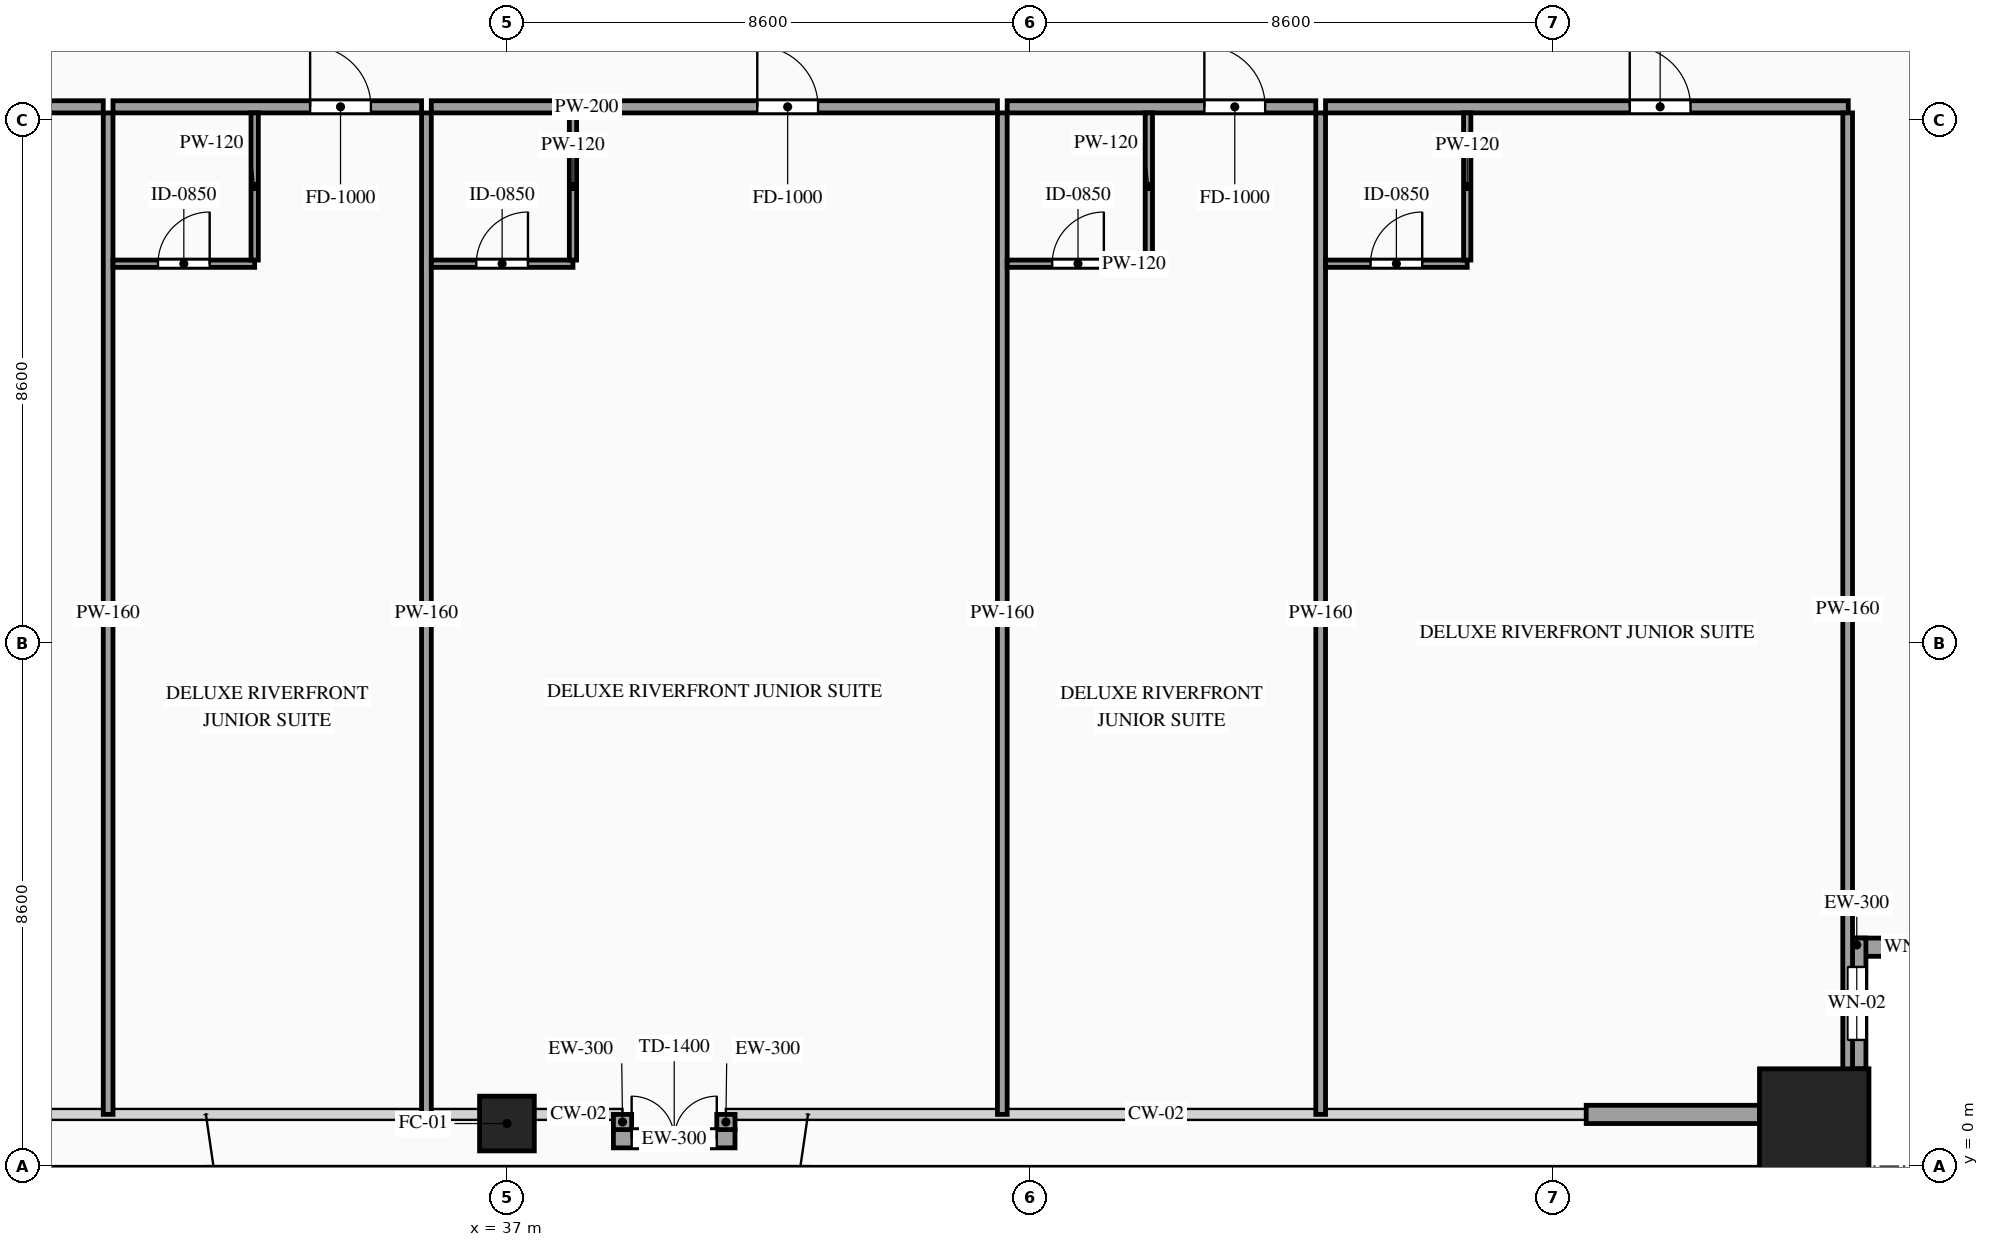
"""IFC4 building model, lengths in metres.
Left out: names, types, materials, properties, quantities, classifications, styles, units other than length and angle.
Written with IfcOpenShell. Run it as: python <this file> out.ifc"""

import sys

from ifc_helpers import new_model, si_unit, direction, frame, frame_2d, origin, origin_2d, place, context, subcontext, project, spatial, rectangle, hollow_rectangle, extrude, source, transform, mapped, element, fill, save


model = new_model("IFC4")
c1 = context("Model", 3, precision=1e-05, world=origin(), true_north=direction((0.0, 1.0)))
c2 = subcontext(c1, "Body", "Model", "MODEL_VIEW")
j1 = project(units=[si_unit("LENGTHUNIT", "METRE"), si_unit("PLANEANGLEUNIT", "RADIAN")], contexts=[c1])
p1 = place(None, origin())
s1 = spatial("IfcSite", under=j1, at=p1, CompositionType="ELEMENT")
p2 = place(p1, origin())
s2 = spatial("IfcBuilding", under=s1, at=p2, CompositionType="ELEMENT")
p3 = place(p2, frame((0.0, 0.0, 64.0)))
s3 = spatial("IfcBuildingStorey", under=s2, at=p3, CompositionType="ELEMENT", Elevation=64.0)
m1 = source(origin(), c2, "Body", "SweptSolid", [
    extrude(hollow_rectangle(XDim=0.9, YDim=0.9, WallThickness=0.042, at=origin_2d()), origin(), (0.0, 0.0, 1.0), 3.6),
])
p4 = place(p3, frame((37.0, 0.7, 0.0), z_axis=(0.0, 0.0, 1.0), x_axis=(1.0, 0.0, 0.0)))
e1 = element("IfcColumn", 1, at=p4, inside=s3, PredefinedType="COLUMN", context=c2, shape_type="MappedRepresentation", body=[
    mapped(m1, transform((0.0, 0.0, 0.0), scale=1.0)),
])
m2 = source(origin(), c2, "Body", "SweptSolid", [
    extrude(hollow_rectangle(XDim=1.8, YDim=1.8, WallThickness=0.08, at=origin_2d()), origin(), (0.0, 0.0, 1.0), 3.6),
])
p5 = place(p3, frame((58.5, 0.7, 0.0), z_axis=(0.0, 0.0, 1.0), x_axis=(1.0, 0.0, 0.0)))
e2 = element("IfcColumn", 2, at=p5, inside=s3, PredefinedType="COLUMN", context=c2, shape_type="MappedRepresentation", body=[
    mapped(m2, transform((0.0, 0.0, 0.0), scale=1.0)),
])
p6 = place(p3, frame((59.05, 3.6, 0.0), z_axis=(0.0, 0.0, 1.0), x_axis=(1.0, 0.0, 0.0)))
e3 = element("IfcWall", 3, at=p6, inside=s3, PredefinedType="SOLIDWALL", context=c2, shape_type="SweptSolid", body=[
    extrude(rectangle(XDim=2.15, YDim=0.3, at=frame_2d((1.075, 0.0))), origin(), (0.0, 0.0, 1.0), 3.38),
])
p7 = place(p6, frame((0.625, 0.0, 0.85)))
e4 = element("IfcOpeningElement", 4, at=p7, cuts=e3, PredefinedType="OPENING", context=c2, shape_type="SweptSolid", body=[
    extrude(rectangle(XDim=0.9, YDim=1.5, at=frame_2d((0.45, 0.75))), frame((0.0, 0.165, 0.0), z_axis=(0.0, -1.0, 0.0), x_axis=(1.0, 0.0, 0.0)), (0.0, 0.0, 1.0), 0.33),
])
p8 = place(p3, frame((59.2, 1.6, 0.0), z_axis=(0.0, 0.0, 1.0), x_axis=(0.0, 1.0, 0.0)))
e5 = element("IfcWall", 5, at=p8, inside=s3, PredefinedType="SOLIDWALL", context=c2, shape_type="SweptSolid", body=[
    extrude(rectangle(XDim=2.15, YDim=0.3, at=frame_2d((1.075, 0.0))), origin(), (0.0, 0.0, 1.0), 3.38),
])
p9 = place(p8, frame((0.475, 0.0, 0.85)))
e6 = element("IfcOpeningElement", 6, at=p9, cuts=e5, PredefinedType="OPENING", context=c2, shape_type="SweptSolid", body=[
    extrude(rectangle(XDim=1.2, YDim=2.1, at=frame_2d((0.6, 1.05))), frame((0.0, 0.165, 0.0), z_axis=(0.0, -1.0, 0.0), x_axis=(1.0, 0.0, 0.0)), (0.0, 0.0, 1.0), 0.33),
])
m3 = source(origin(), c2, "Body", "SweptSolid", [
    extrude(rectangle(XDim=2.85, YDim=0.3, at=frame_2d((1.425, 0.0))), origin(), (0.0, 0.0, 1.0), 2.775),
])
p10 = place(p3, frame((54.75, 0.85, 0.0), z_axis=(0.0, 0.0, 1.0), x_axis=(1.0, 0.0, 0.0)))
e7 = element("IfcWall", 7, at=p10, inside=s3, PredefinedType="SOLIDWALL", context=c2, shape_type="MappedRepresentation", body=[
    mapped(m3, transform((0.0, 0.0, 0.0), scale=1.0)),
])
p11 = place(p3, frame((38.751, 0.45, 0.0), z_axis=(0.0, 0.0, 1.0), x_axis=(1.0, 0.0, 0.0)))
e8 = element("IfcWall", 8, at=p11, inside=s3, PredefinedType="SOLIDWALL", context=c2, shape_type="SweptSolid", body=[
    extrude(rectangle(XDim=2.0, YDim=0.3, at=frame_2d((1.0, 0.0))), origin(), (0.0, 0.0, 1.0), 3.38),
])
p12 = place(p11, frame((0.3, 0.0, 0.0)))
e9 = element("IfcOpeningElement", 9, at=p12, cuts=e8, PredefinedType="OPENING", context=c2, shape_type="SweptSolid", body=[
    extrude(rectangle(XDim=1.4, YDim=2.3, at=frame_2d((0.7, 1.15))), frame((0.0, 0.165, 0.0), z_axis=(0.0, -1.0, 0.0), x_axis=(1.0, 0.0, 0.0)), (0.0, 0.0, 1.0), 0.33),
])
m4 = source(origin(), c2, "Body", "SweptSolid", [
    extrude(rectangle(XDim=0.25, YDim=0.3, at=frame_2d((0.125, 0.0))), origin(), (0.0, 0.0, 1.0), 3.38),
])
for number, where, z_axis, x_axis in (
    (10, (38.901, 0.85, 0.0), (0.0, 0.0, 1.0), (0.0, -1.0, 0.0)),
    (11, (40.601, 0.6, 0.0), (0.0, 0.0, 1.0), (0.0, 1.0, 0.0)),
):
    element("IfcWall", number, at=place(p3, frame(where, z_axis=z_axis, x_axis=x_axis)), inside=s3, PredefinedType="SOLIDWALL", context=c2, shape_type="MappedRepresentation", body=[
        mapped(m4, transform((0.0, 0.0, 0.0), scale=1.0)),
    ])
p13 = place(p3, frame((21.197, 17.42, 0.0), z_axis=(0.0, 0.0, 1.0), x_axis=(1.0, 0.0, 0.0)))
e12 = element("IfcWall", 12, at=p13, inside=s3, PredefinedType="PARTITIONING", context=c2, shape_type="SweptSolid", body=[
    extrude(rectangle(XDim=9.164, YDim=0.2, at=frame_2d((4.582, 0.0))), origin(), (0.0, 0.0, 1.0), 3.38),
])
p14 = place(p13, frame((5.287, 0.0, 0.0)))
e13 = element("IfcOpeningElement", 13, at=p14, cuts=e12, PredefinedType="OPENING", context=c2, shape_type="SweptSolid", body=[
    extrude(rectangle(XDim=1.0, YDim=2.2, at=frame_2d((0.5, 1.1))), frame((0.0, 0.115, 0.0), z_axis=(0.0, -1.0, 0.0), x_axis=(1.0, 0.0, 0.0)), (0.0, 0.0, 1.0), 0.23),
])
m5 = source(origin(), c2, "Body", "SweptSolid", [
    extrude(rectangle(XDim=16.47, YDim=0.16, at=frame_2d((8.235, 0.0))), origin(), (0.0, 0.0, 1.0), 3.38),
])
p15 = place(p3, frame((30.441, 0.85, 0.0), z_axis=(0.0, 0.0, 1.0), x_axis=(0.0, 1.0, 0.0)))
e14 = element("IfcWall", 14, at=p15, inside=s3, PredefinedType="PARTITIONING", context=c2, shape_type="MappedRepresentation", body=[
    mapped(m5, transform((0.0, 0.0, 0.0), scale=1.0)),
])
p16 = place(p3, frame((30.521, 17.42, 0.0), z_axis=(0.0, 0.0, 1.0), x_axis=(1.0, 0.0, 0.0)))
e15 = element("IfcWall", 15, at=p16, inside=s3, PredefinedType="PARTITIONING", context=c2, shape_type="SweptSolid", body=[
    extrude(rectangle(XDim=5.075, YDim=0.2, at=frame_2d((2.538, 0.0))), origin(), (0.0, 0.0, 1.0), 3.38),
])
p17 = place(p16, frame((3.242, 0.0, 0.0)))
e16 = element("IfcOpeningElement", 16, at=p17, cuts=e15, PredefinedType="OPENING", context=c2, shape_type="SweptSolid", body=[
    extrude(rectangle(XDim=1.0, YDim=2.2, at=frame_2d((0.5, 1.1))), frame((0.0, 0.115, 0.0), z_axis=(0.0, -1.0, 0.0), x_axis=(1.0, 0.0, 0.0)), (0.0, 0.0, 1.0), 0.23),
])
p18 = place(p3, frame((35.676, 0.85, 0.0), z_axis=(0.0, 0.0, 1.0), x_axis=(0.0, 1.0, 0.0)))
e17 = element("IfcWall", 17, at=p18, inside=s3, PredefinedType="PARTITIONING", context=c2, shape_type="MappedRepresentation", body=[
    mapped(m5, transform((0.0, 0.0, 0.0), scale=1.0)),
])
p19 = place(p3, frame((30.521, 14.84, 0.0), z_axis=(0.0, 0.0, 1.0), x_axis=(1.0, 0.0, 0.0)))
e18 = element("IfcWall", 18, at=p19, inside=s3, PredefinedType="PARTITIONING", context=c2, shape_type="SweptSolid", body=[
    extrude(rectangle(XDim=2.33, YDim=0.12, at=frame_2d((1.165, 0.0))), origin(), (0.0, 0.0, 1.0), 3.38),
])
p20 = place(p19, frame((0.74, 0.0, 0.0)))
e19 = element("IfcOpeningElement", 19, at=p20, cuts=e18, PredefinedType="OPENING", context=c2, shape_type="SweptSolid", body=[
    extrude(rectangle(XDim=0.85, YDim=2.1, at=frame_2d((0.425, 1.05))), frame((0.0, 0.075, 0.0), z_axis=(0.0, -1.0, 0.0), x_axis=(1.0, 0.0, 0.0)), (0.0, 0.0, 1.0), 0.15),
])
m6 = source(origin(), c2, "Body", "SweptSolid", [
    extrude(rectangle(XDim=2.42, YDim=0.12, at=frame_2d((1.21, 0.0))), origin(), (0.0, 0.0, 1.0), 3.38),
])
p21 = place(p3, frame((32.851, 14.9, 0.0), z_axis=(0.0, 0.0, 1.0), x_axis=(0.0, 1.0, 0.0)))
e20 = element("IfcWall", 20, at=p21, inside=s3, PredefinedType="PARTITIONING", context=c2, shape_type="MappedRepresentation", body=[
    mapped(m6, transform((0.0, 0.0, 0.0), scale=1.0)),
])
p22 = place(p3, frame((35.756, 17.42, 0.0), z_axis=(0.0, 0.0, 1.0), x_axis=(1.0, 0.0, 0.0)))
e21 = element("IfcWall", 21, at=p22, inside=s3, PredefinedType="PARTITIONING", context=c2, shape_type="SweptSolid", body=[
    extrude(rectangle(XDim=9.311, YDim=0.2, at=frame_2d((4.655, 0.0))), origin(), (0.0, 0.0, 1.0), 3.38),
])
p23 = place(p22, frame((5.361, 0.0, 0.0)))
e22 = element("IfcOpeningElement", 22, at=p23, cuts=e21, PredefinedType="OPENING", context=c2, shape_type="SweptSolid", body=[
    extrude(rectangle(XDim=1.0, YDim=2.2, at=frame_2d((0.5, 1.1))), frame((0.0, 0.115, 0.0), z_axis=(0.0, -1.0, 0.0), x_axis=(1.0, 0.0, 0.0)), (0.0, 0.0, 1.0), 0.23),
])
p24 = place(p3, frame((45.147, 0.85, 0.0), z_axis=(0.0, 0.0, 1.0), x_axis=(0.0, 1.0, 0.0)))
e23 = element("IfcWall", 23, at=p24, inside=s3, PredefinedType="PARTITIONING", context=c2, shape_type="MappedRepresentation", body=[
    mapped(m5, transform((0.0, 0.0, 0.0), scale=1.0)),
])
p25 = place(p3, frame((35.756, 14.84, 0.0), z_axis=(0.0, 0.0, 1.0), x_axis=(1.0, 0.0, 0.0)))
e24 = element("IfcWall", 24, at=p25, inside=s3, PredefinedType="PARTITIONING", context=c2, shape_type="SweptSolid", body=[
    extrude(rectangle(XDim=2.33, YDim=0.12, at=frame_2d((1.165, 0.0))), origin(), (0.0, 0.0, 1.0), 3.38),
])
p26 = place(p25, frame((0.74, 0.0, 0.0)))
e25 = element("IfcOpeningElement", 25, at=p26, cuts=e24, PredefinedType="OPENING", context=c2, shape_type="SweptSolid", body=[
    extrude(rectangle(XDim=0.85, YDim=2.1, at=frame_2d((0.425, 1.05))), frame((0.0, 0.075, 0.0), z_axis=(0.0, -1.0, 0.0), x_axis=(1.0, 0.0, 0.0)), (0.0, 0.0, 1.0), 0.15),
])
p27 = place(p3, frame((38.086, 14.9, 0.0), z_axis=(0.0, 0.0, 1.0), x_axis=(0.0, 1.0, 0.0)))
e26 = element("IfcWall", 26, at=p27, inside=s3, PredefinedType="PARTITIONING", context=c2, shape_type="MappedRepresentation", body=[
    mapped(m6, transform((0.0, 0.0, 0.0), scale=1.0)),
])
p28 = place(p3, frame((45.227, 17.42, 0.0), z_axis=(0.0, 0.0, 1.0), x_axis=(1.0, 0.0, 0.0)))
e27 = element("IfcWall", 27, at=p28, inside=s3, PredefinedType="PARTITIONING", context=c2, shape_type="SweptSolid", body=[
    extrude(rectangle(XDim=5.076, YDim=0.2, at=frame_2d((2.538, 0.0))), origin(), (0.0, 0.0, 1.0), 3.38),
])
p29 = place(p28, frame((3.243, 0.0, 0.0)))
e28 = element("IfcOpeningElement", 28, at=p29, cuts=e27, PredefinedType="OPENING", context=c2, shape_type="SweptSolid", body=[
    extrude(rectangle(XDim=1.0, YDim=2.2, at=frame_2d((0.5, 1.1))), frame((0.0, 0.115, 0.0), z_axis=(0.0, -1.0, 0.0), x_axis=(1.0, 0.0, 0.0)), (0.0, 0.0, 1.0), 0.23),
])
p30 = place(p3, frame((50.383, 0.85, 0.0), z_axis=(0.0, 0.0, 1.0), x_axis=(0.0, 1.0, 0.0)))
e29 = element("IfcWall", 29, at=p30, inside=s3, PredefinedType="PARTITIONING", context=c2, shape_type="MappedRepresentation", body=[
    mapped(m5, transform((0.0, 0.0, 0.0), scale=1.0)),
])
p31 = place(p3, frame((45.227, 14.84, 0.0), z_axis=(0.0, 0.0, 1.0), x_axis=(1.0, 0.0, 0.0)))
e30 = element("IfcWall", 30, at=p31, inside=s3, PredefinedType="PARTITIONING", context=c2, shape_type="SweptSolid", body=[
    extrude(rectangle(XDim=2.33, YDim=0.12, at=frame_2d((1.165, 0.0))), origin(), (0.0, 0.0, 1.0), 3.38),
])
p32 = place(p31, frame((0.74, 0.0, 0.0)))
e31 = element("IfcOpeningElement", 31, at=p32, cuts=e30, PredefinedType="OPENING", context=c2, shape_type="SweptSolid", body=[
    extrude(rectangle(XDim=0.85, YDim=2.1, at=frame_2d((0.425, 1.05))), frame((0.0, 0.075, 0.0), z_axis=(0.0, -1.0, 0.0), x_axis=(1.0, 0.0, 0.0)), (0.0, 0.0, 1.0), 0.15),
])
p33 = place(p3, frame((47.557, 14.9, 0.0), z_axis=(0.0, 0.0, 1.0), x_axis=(0.0, 1.0, 0.0)))
e32 = element("IfcWall", 32, at=p33, inside=s3, PredefinedType="PARTITIONING", context=c2, shape_type="MappedRepresentation", body=[
    mapped(m6, transform((0.0, 0.0, 0.0), scale=1.0)),
])
p34 = place(p3, frame((50.463, 17.42, 0.0), z_axis=(0.0, 0.0, 1.0), x_axis=(1.0, 0.0, 0.0)))
e33 = element("IfcWall", 33, at=p34, inside=s3, PredefinedType="PARTITIONING", context=c2, shape_type="SweptSolid", body=[
    extrude(rectangle(XDim=8.597, YDim=0.2, at=frame_2d((4.299, 0.0))), origin(), (0.0, 0.0, 1.0), 3.38),
])
p35 = place(p34, frame((5.003, 0.0, 0.0)))
e34 = element("IfcOpeningElement", 34, at=p35, cuts=e33, PredefinedType="OPENING", context=c2, shape_type="SweptSolid", body=[
    extrude(rectangle(XDim=1.0, YDim=2.2, at=frame_2d((0.5, 1.1))), frame((0.0, 0.115, 0.0), z_axis=(0.0, -1.0, 0.0), x_axis=(1.0, 0.0, 0.0)), (0.0, 0.0, 1.0), 0.23),
])
m7 = source(origin(), c2, "Body", "SweptSolid", [
    extrude(rectangle(XDim=16.32, YDim=0.16, at=frame_2d((8.16, 0.0))), origin(), (0.0, 0.0, 1.0), 3.38),
])
p36 = place(p3, frame((59.05, 1.0, 0.0), z_axis=(0.0, 0.0, 1.0), x_axis=(0.0, 1.0, 0.0)))
e35 = element("IfcWall", 35, at=p36, inside=s3, PredefinedType="PARTITIONING", context=c2, shape_type="MappedRepresentation", body=[
    mapped(m7, transform((0.0, 0.0, 0.0), scale=1.0)),
])
p37 = place(p3, frame((50.463, 14.84, 0.0), z_axis=(0.0, 0.0, 1.0), x_axis=(1.0, 0.0, 0.0)))
e36 = element("IfcWall", 36, at=p37, inside=s3, PredefinedType="PARTITIONING", context=c2, shape_type="SweptSolid", body=[
    extrude(rectangle(XDim=2.33, YDim=0.12, at=frame_2d((1.165, 0.0))), origin(), (0.0, 0.0, 1.0), 3.38),
])
p38 = place(p37, frame((0.74, 0.0, 0.0)))
e37 = element("IfcOpeningElement", 37, at=p38, cuts=e36, PredefinedType="OPENING", context=c2, shape_type="SweptSolid", body=[
    extrude(rectangle(XDim=0.85, YDim=2.1, at=frame_2d((0.425, 1.05))), frame((0.0, 0.075, 0.0), z_axis=(0.0, -1.0, 0.0), x_axis=(1.0, 0.0, 0.0)), (0.0, 0.0, 1.0), 0.15),
])
p39 = place(p3, frame((52.793, 14.9, 0.0), z_axis=(0.0, 0.0, 1.0), x_axis=(0.0, 1.0, 0.0)))
e38 = element("IfcWall", 38, at=p39, inside=s3, PredefinedType="PARTITIONING", context=c2, shape_type="MappedRepresentation", body=[
    mapped(m6, transform((0.0, 0.0, 0.0), scale=1.0)),
])
m8 = source(origin(), c2, "Body", "SweptSolid", [
    extrude(rectangle(XDim=0.9, YDim=1.5, at=frame_2d((0.45, 0.75))), frame((0.0, 0.03, 0.0), z_axis=(0.0, -1.0, 0.0), x_axis=(1.0, 0.0, 0.0)), (0.0, 0.0, 1.0), 0.06),
])
p40 = place(p7, origin())
e39 = element("IfcWindow", 39, at=p40, inside=s3, PartitioningType="SINGLE_PANEL", PredefinedType="WINDOW", context=c2, shape_type="MappedRepresentation", body=[
    mapped(m8, transform((0.0, 0.0, 0.0), scale=1.0)),
])
fill(e4, e39)
m9 = source(origin(), c2, "Body", "SweptSolid", [
    extrude(rectangle(XDim=1.2, YDim=2.1, at=frame_2d((0.6, 1.05))), frame((0.0, 0.03, 0.0), z_axis=(0.0, -1.0, 0.0), x_axis=(1.0, 0.0, 0.0)), (0.0, 0.0, 1.0), 0.06),
])
p41 = place(p9, origin())
e40 = element("IfcWindow", 40, at=p41, inside=s3, PartitioningType="SINGLE_PANEL", PredefinedType="WINDOW", context=c2, shape_type="MappedRepresentation", body=[
    mapped(m9, transform((0.0, 0.0, 0.0), scale=1.0)),
])
fill(e6, e40)
m10 = source(origin(), c2, "Body", "SweptSolid", [
    extrude(rectangle(XDim=1.4, YDim=2.3, at=frame_2d((0.7, 1.15))), frame((0.0, 0.025, 0.0), z_axis=(0.0, -1.0, 0.0), x_axis=(1.0, 0.0, 0.0)), (0.0, 0.0, 1.0), 0.05),
])
p42 = place(p12, origin())
e41 = element("IfcDoor", 41, at=p42, inside=s3, OperationType="DOUBLE_DOOR_SINGLE_SWING", PredefinedType="DOOR", context=c2, shape_type="MappedRepresentation", body=[
    mapped(m10, transform((0.0, 0.0, 0.0), scale=1.0)),
])
fill(e9, e41)
m11 = source(origin(), c2, "Body", "SweptSolid", [
    extrude(rectangle(XDim=1.0, YDim=2.2, at=frame_2d((0.5, 1.1))), frame((0.0, 0.025, 0.0), z_axis=(0.0, -1.0, 0.0), x_axis=(1.0, 0.0, 0.0)), (0.0, 0.0, 1.0), 0.05),
])
p43 = place(p17, origin())
e42 = element("IfcDoor", 42, at=p43, inside=s3, OperationType="SINGLE_SWING_LEFT", PredefinedType="DOOR", context=c2, shape_type="MappedRepresentation", body=[
    mapped(m11, transform((0.0, 0.0, 0.0), scale=1.0)),
])
fill(e16, e42)
m12 = source(origin(), c2, "Body", "SweptSolid", [
    extrude(rectangle(XDim=0.85, YDim=2.1, at=frame_2d((0.425, 1.05))), frame((0.0, 0.025, 0.0), z_axis=(0.0, -1.0, 0.0), x_axis=(1.0, 0.0, 0.0)), (0.0, 0.0, 1.0), 0.05),
])
p44 = place(p20, origin())
e43 = element("IfcDoor", 43, at=p44, inside=s3, OperationType="SINGLE_SWING_RIGHT", PredefinedType="DOOR", context=c2, shape_type="MappedRepresentation", body=[
    mapped(m12, transform((0.0, 0.0, 0.0), scale=1.0)),
])
fill(e19, e43)
p45 = place(p23, origin())
e44 = element("IfcDoor", 44, at=p45, inside=s3, OperationType="SINGLE_SWING_LEFT", PredefinedType="DOOR", context=c2, shape_type="MappedRepresentation", body=[
    mapped(m11, transform((0.0, 0.0, 0.0), scale=1.0)),
])
fill(e22, e44)
p46 = place(p26, origin())
e45 = element("IfcDoor", 45, at=p46, inside=s3, OperationType="SINGLE_SWING_RIGHT", PredefinedType="DOOR", context=c2, shape_type="MappedRepresentation", body=[
    mapped(m12, transform((0.0, 0.0, 0.0), scale=1.0)),
])
fill(e25, e45)
p47 = place(p29, origin())
e46 = element("IfcDoor", 46, at=p47, inside=s3, OperationType="SINGLE_SWING_LEFT", PredefinedType="DOOR", context=c2, shape_type="MappedRepresentation", body=[
    mapped(m11, transform((0.0, 0.0, 0.0), scale=1.0)),
])
fill(e28, e46)
p48 = place(p32, origin())
e47 = element("IfcDoor", 47, at=p48, inside=s3, OperationType="SINGLE_SWING_RIGHT", PredefinedType="DOOR", context=c2, shape_type="MappedRepresentation", body=[
    mapped(m12, transform((0.0, 0.0, 0.0), scale=1.0)),
])
fill(e31, e47)
p49 = place(p35, origin())
e48 = element("IfcDoor", 48, at=p49, inside=s3, OperationType="SINGLE_SWING_LEFT", PredefinedType="DOOR", context=c2, shape_type="MappedRepresentation", body=[
    mapped(m11, transform((0.0, 0.0, 0.0), scale=1.0)),
])
fill(e34, e48)
p50 = place(p38, origin())
e49 = element("IfcDoor", 49, at=p50, inside=s3, OperationType="SINGLE_SWING_RIGHT", PredefinedType="DOOR", context=c2, shape_type="MappedRepresentation", body=[
    mapped(m12, transform((0.0, 0.0, 0.0), scale=1.0)),
])
fill(e37, e49)
save(model, sys.argv[1])
